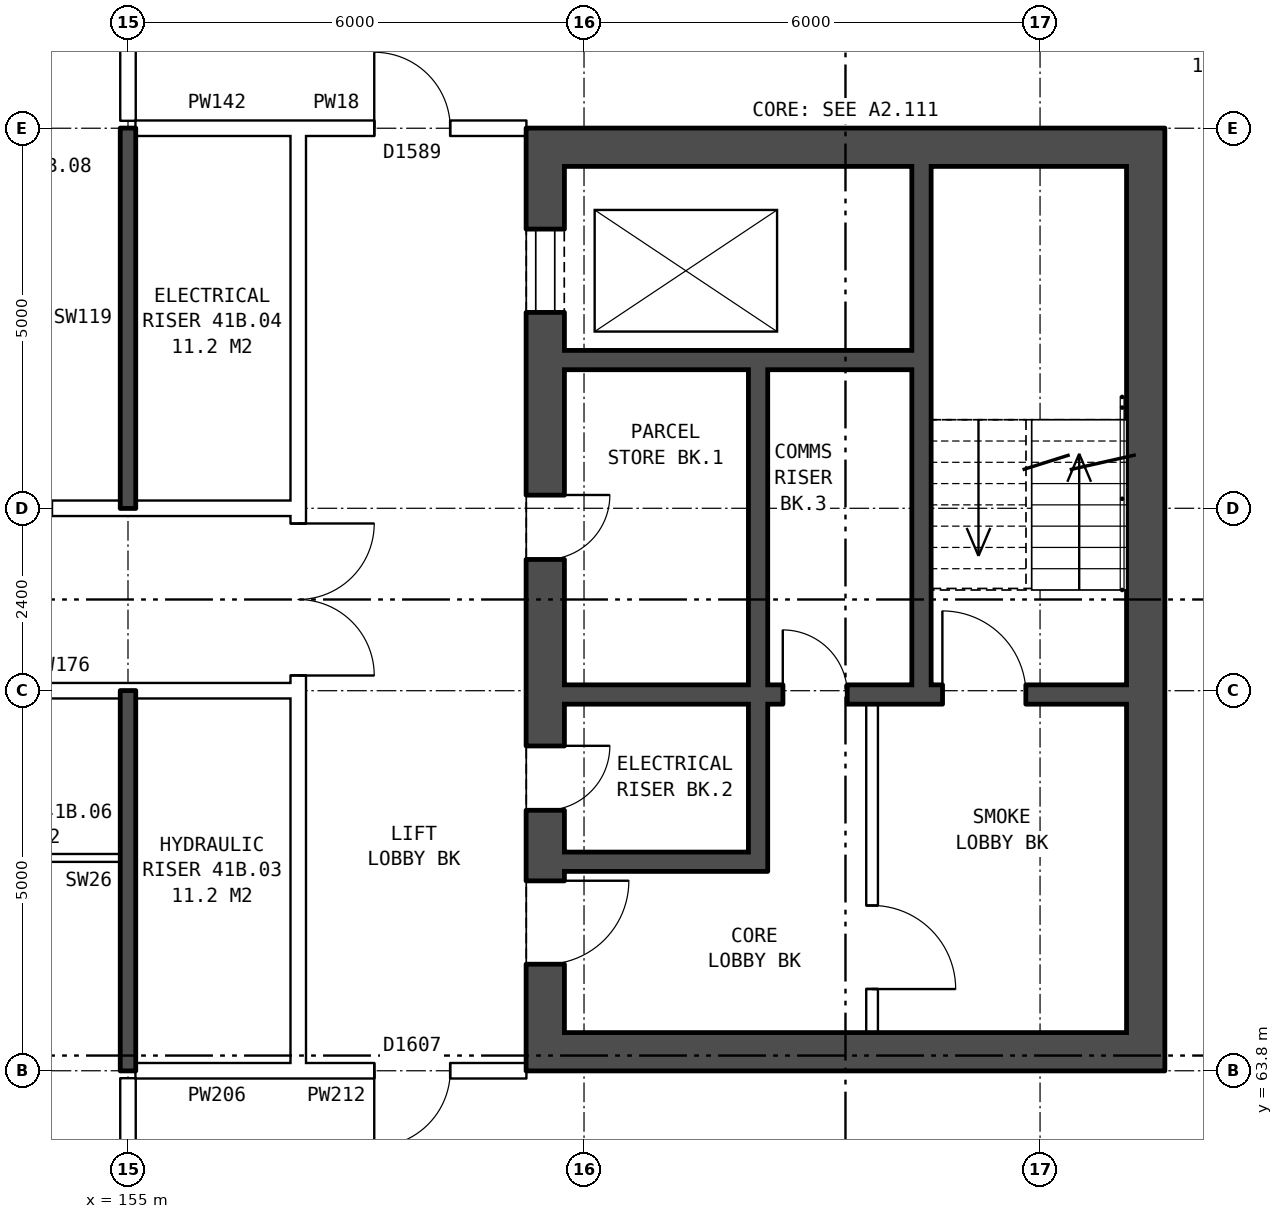
"""IFC4 building model, lengths in metres.
Left out: names, types, materials, properties, quantities, classifications, styles, units other than length and angle.
Written with IfcOpenShell. Run it as: python <this file> out.ifc"""

import sys

from ifc_helpers import new_model, si_unit, direction, frame, frame_2d, origin, place, context, subcontext, project, spatial, rectangle, extrude, element, fill, save


model = new_model("IFC4")
c1 = context("Model", 3, precision=1e-05, world=origin(), true_north=direction((0.0, 1.0)))
c2 = subcontext(c1, "Body", "Model", "MODEL_VIEW")
j1 = project(units=[si_unit("LENGTHUNIT", "METRE"), si_unit("PLANEANGLEUNIT", "RADIAN")], contexts=[c1])
p1 = place(None, origin())
s1 = spatial("IfcSite", under=j1, at=p1, CompositionType="ELEMENT")
p2 = place(p1, origin())
s2 = spatial("IfcBuilding", under=s1, at=p2, CompositionType="ELEMENT")
p3 = place(p2, frame((0.0, 0.0, 148.5)))
s3 = spatial("IfcBuildingStorey", under=s2, at=p3, CompositionType="ELEMENT", Elevation=148.5)
p4 = place(p3, frame((160.49, 76.2, 0.0), z_axis=(0.0, 0.0, 1.0), x_axis=(0.0, -1.0, 0.0)))
e1 = element("IfcWall", 1, at=p4, inside=s3, PredefinedType="SHEAR", context=c2, shape_type="SweptSolid", body=[
    extrude(rectangle(XDim=12.4, YDim=0.5, at=frame_2d((6.2, 0.0))), origin(), (0.0, 0.0, 1.0), 2.85),
])
p5 = place(p4, frame((1.325, 0.0, 0.0)))
e2 = element("IfcOpeningElement", 2, at=p5, cuts=e1, PredefinedType="OPENING", context=c2, shape_type="SweptSolid", body=[
    extrude(rectangle(XDim=1.1, YDim=2.1, at=frame_2d((0.55, 1.05))), frame((0.0, 0.26, 0.0), z_axis=(0.0, -1.0, 0.0), x_axis=(1.0, 0.0, 0.0)), (0.0, 0.0, 1.0), 0.52),
])
p6 = place(p4, frame((4.825, 0.0, 0.0)))
e3 = element("IfcOpeningElement", 3, at=p6, cuts=e1, PredefinedType="OPENING", context=c2, shape_type="SweptSolid", body=[
    extrude(rectangle(XDim=0.85, YDim=2.1, at=frame_2d((0.425, 1.05))), frame((0.0, 0.26, 0.0), z_axis=(0.0, -1.0, 0.0), x_axis=(1.0, 0.0, 0.0)), (0.0, 0.0, 1.0), 0.52),
])
p7 = place(p4, frame((9.9, 0.0, 0.0)))
e4 = element("IfcOpeningElement", 4, at=p7, cuts=e1, PredefinedType="OPENING", context=c2, shape_type="SweptSolid", body=[
    extrude(rectangle(XDim=1.1, YDim=2.1, at=frame_2d((0.55, 1.05))), frame((0.0, 0.26, 0.0), z_axis=(0.0, -1.0, 0.0), x_axis=(1.0, 0.0, 0.0)), (0.0, 0.0, 1.0), 0.52),
])
p8 = place(p4, frame((8.125, 0.0, 0.0)))
e5 = element("IfcOpeningElement", 5, at=p8, cuts=e1, PredefinedType="OPENING", context=c2, shape_type="SweptSolid", body=[
    extrude(rectangle(XDim=0.85, YDim=2.1, at=frame_2d((0.425, 1.05))), frame((0.0, 0.26, 0.0), z_axis=(0.0, -1.0, 0.0), x_axis=(1.0, 0.0, 0.0)), (0.0, 0.0, 1.0), 0.52),
])
p9 = place(p3, frame((168.39, 76.2, 0.0), z_axis=(0.0, 0.0, 1.0), x_axis=(0.0, -1.0, 0.0)))
e6 = element("IfcWall", 6, at=p9, inside=s3, PredefinedType="SHEAR", context=c2, shape_type="SweptSolid", body=[
    extrude(rectangle(XDim=12.4, YDim=0.5, at=frame_2d((6.2, 0.0))), origin(), (0.0, 0.0, 1.0), 2.85),
])
for number, where, z_axis, x_axis in (
    (7, (160.74, 75.95, 0.0), (0.0, 0.0, 1.0), (1.0, 0.0, 0.0)),
    (8, (160.74, 64.05, 0.0), (0.0, 0.0, 1.0), (1.0, 0.0, 0.0)),
):
    element("IfcWall", number, at=place(p3, frame(where, z_axis=z_axis, x_axis=x_axis)), inside=s3, PredefinedType="SHEAR", context=c2, shape_type="SweptSolid", body=[
        extrude(rectangle(XDim=7.4, YDim=0.5, at=frame_2d((3.7, 0.0))), origin(), (0.0, 0.0, 1.0), 2.85),
    ])
p10 = place(p3, frame((160.74, 73.15, 0.0), z_axis=(0.0, 0.0, 1.0), x_axis=(1.0, 0.0, 0.0)))
e9 = element("IfcWall", 9, at=p10, inside=s3, PredefinedType="SHEAR", context=c2, shape_type="SweptSolid", body=[
    extrude(rectangle(XDim=4.575, YDim=0.25, at=frame_2d((2.288, 0.0))), origin(), (0.0, 0.0, 1.0), 2.85),
])
p11 = place(p3, frame((160.74, 68.75, 0.0), z_axis=(0.0, 0.0, 1.0), x_axis=(1.0, 0.0, 0.0)))
e10 = element("IfcWall", 10, at=p11, inside=s3, PredefinedType="SHEAR", context=c2, shape_type="SweptSolid", body=[
    extrude(rectangle(XDim=7.4, YDim=0.25, at=frame_2d((3.7, 0.0))), origin(), (0.0, 0.0, 1.0), 2.85),
])
p12 = place(p11, frame((4.975, 0.0, 0.0)))
e11 = element("IfcOpeningElement", 11, at=p12, cuts=e10, PredefinedType="OPENING", context=c2, shape_type="SweptSolid", body=[
    extrude(rectangle(XDim=1.1, YDim=2.1, at=frame_2d((0.55, 1.05))), frame((0.0, 0.135, 0.0), z_axis=(0.0, -1.0, 0.0), x_axis=(1.0, 0.0, 0.0)), (0.0, 0.0, 1.0), 0.27),
])
p13 = place(p11, frame((2.875, 0.0, 0.0)))
e12 = element("IfcOpeningElement", 12, at=p13, cuts=e10, PredefinedType="OPENING", context=c2, shape_type="SweptSolid", body=[
    extrude(rectangle(XDim=0.85, YDim=2.1, at=frame_2d((0.425, 1.05))), frame((0.0, 0.135, 0.0), z_axis=(0.0, -1.0, 0.0), x_axis=(1.0, 0.0, 0.0)), (0.0, 0.0, 1.0), 0.27),
])
p14 = place(p3, frame((160.74, 66.55, 0.0), z_axis=(0.0, 0.0, 1.0), x_axis=(1.0, 0.0, 0.0)))
e13 = element("IfcWall", 13, at=p14, inside=s3, PredefinedType="SHEAR", context=c2, shape_type="SweptSolid", body=[
    extrude(rectangle(XDim=2.425, YDim=0.25, at=frame_2d((1.212, 0.0))), origin(), (0.0, 0.0, 1.0), 2.85),
])
p15 = place(p3, frame((163.29, 73.025, 0.0), z_axis=(0.0, 0.0, 1.0), x_axis=(0.0, -1.0, 0.0)))
e14 = element("IfcWall", 14, at=p15, inside=s3, PredefinedType="SHEAR", context=c2, shape_type="SweptSolid", body=[
    extrude(rectangle(XDim=4.15, YDim=0.25, at=frame_2d((2.075, 0.0))), origin(), (0.0, 0.0, 1.0), 2.85),
])
p16 = place(p3, frame((163.29, 68.625, 0.0), z_axis=(0.0, 0.0, 1.0), x_axis=(0.0, -1.0, 0.0)))
e15 = element("IfcWall", 15, at=p16, inside=s3, PredefinedType="SHEAR", context=c2, shape_type="SweptSolid", body=[
    extrude(rectangle(XDim=2.2, YDim=0.25, at=frame_2d((1.1, 0.0))), origin(), (0.0, 0.0, 1.0), 2.85),
])
p17 = place(p3, frame((164.79, 68.625, 0.0), z_axis=(0.0, 0.0, 1.0), x_axis=(0.0, -1.0, 0.0)))
e16 = element("IfcWall", 16, at=p17, inside=s3, PredefinedType="PARTITIONING", context=c2, shape_type="SweptSolid", body=[
    extrude(rectangle(XDim=4.325, YDim=0.15, at=frame_2d((2.163, 0.0))), origin(), (0.0, 0.0, 1.0), 2.85),
])
p18 = place(p17, frame((2.65, 0.0, 0.0)))
e17 = element("IfcOpeningElement", 17, at=p18, cuts=e16, PredefinedType="OPENING", context=c2, shape_type="SweptSolid", body=[
    extrude(rectangle(XDim=1.1, YDim=2.1, at=frame_2d((0.55, 1.05))), frame((0.0, 0.085, 0.0), z_axis=(0.0, -1.0, 0.0), x_axis=(1.0, 0.0, 0.0)), (0.0, 0.0, 1.0), 0.17),
])
p19 = place(p3, frame((165.44, 75.7, 0.0), z_axis=(0.0, 0.0, 1.0), x_axis=(0.0, -1.0, 0.0)))
e18 = element("IfcWall", 18, at=p19, inside=s3, PredefinedType="SHEAR", context=c2, shape_type="SweptSolid", body=[
    extrude(rectangle(XDim=6.825, YDim=0.25, at=frame_2d((3.413, 0.0))), origin(), (0.0, 0.0, 1.0), 2.85),
])
p20 = place(p3, frame((157.24, 63.9, 0.0), z_axis=(0.0, 0.0, 1.0), x_axis=(0.0, 1.0, 0.0)))
e19 = element("IfcWall", 19, at=p20, inside=s3, PredefinedType="PARTITIONING", context=c2, shape_type="SweptSolid", body=[
    extrude(rectangle(XDim=12.2, YDim=0.2, at=frame_2d((6.1, 0.0))), origin(), (0.0, 0.0, 1.0), 2.85),
])
p21 = place(p20, frame((5.1, 0.0, 0.0)))
e20 = element("IfcOpeningElement", 20, at=p21, cuts=e19, PredefinedType="OPENING", context=c2, shape_type="SweptSolid", body=[
    extrude(rectangle(XDim=2.0, YDim=2.1, at=frame_2d((1.0, 1.05))), frame((0.0, 0.11, 0.0), z_axis=(0.0, -1.0, 0.0), x_axis=(1.0, 0.0, 0.0)), (0.0, 0.0, 1.0), 0.22),
])
p22 = place(p3, frame((155.1, 63.8, 0.0), z_axis=(0.0, 0.0, 1.0), x_axis=(1.0, 0.0, 0.0)))
e21 = element("IfcWall", 21, at=p22, inside=s3, PredefinedType="PARTITIONING", context=c2, shape_type="SweptSolid", body=[
    extrude(rectangle(XDim=2.14, YDim=0.2, at=frame_2d((1.07, 0.0))), origin(), (0.0, 0.0, 1.0), 2.85),
])
p23 = place(p3, frame((157.24, 63.8, 0.0), z_axis=(0.0, 0.0, 1.0), x_axis=(1.0, 0.0, 0.0)))
e22 = element("IfcWall", 22, at=p23, inside=s3, PredefinedType="PARTITIONING", context=c2, shape_type="SweptSolid", body=[
    extrude(rectangle(XDim=3.0, YDim=0.2, at=frame_2d((1.5, 0.0))), origin(), (0.0, 0.0, 1.0), 2.85),
])
p24 = place(p23, frame((1.0, 0.0, 0.0)))
e23 = element("IfcOpeningElement", 23, at=p24, cuts=e22, PredefinedType="OPENING", context=c2, shape_type="SweptSolid", body=[
    extrude(rectangle(XDim=1.0, YDim=2.1, at=frame_2d((0.5, 1.05))), frame((0.0, 0.11, 0.0), z_axis=(0.0, -1.0, 0.0), x_axis=(1.0, 0.0, 0.0)), (0.0, 0.0, 1.0), 0.22),
])
p25 = place(p3, frame((152.0, 66.6, 0.0), z_axis=(0.0, 0.0, 1.0), x_axis=(1.0, 0.0, 0.0)))
e24 = element("IfcWall", 24, at=p25, inside=s3, PredefinedType="PARTITIONING", context=c2, shape_type="SweptSolid", body=[
    extrude(rectangle(XDim=2.9, YDim=0.1, at=frame_2d((1.45, 0.0))), origin(), (0.0, 0.0, 1.0), 2.85),
])
p26 = place(p3, frame((142.76, 68.8, 0.0), z_axis=(0.0, 0.0, 1.0), x_axis=(1.0, 0.0, 0.0)))
e25 = element("IfcWall", 25, at=p26, inside=s3, PredefinedType="PARTITIONING", context=c2, shape_type="SweptSolid", body=[
    extrude(rectangle(XDim=14.48, YDim=0.2, at=frame_2d((7.24, 0.0))), origin(), (0.0, 0.0, 1.0), 2.85),
])
p27 = place(p26, frame((1.12, 0.0, 0.0)))
e26 = element("IfcOpeningElement", 26, at=p27, cuts=e25, PredefinedType="OPENING", context=c2, shape_type="SweptSolid", body=[
    extrude(rectangle(XDim=1.0, YDim=2.1, at=frame_2d((0.5, 1.05))), frame((0.0, 0.11, 0.0), z_axis=(0.0, -1.0, 0.0), x_axis=(1.0, 0.0, 0.0)), (0.0, 0.0, 1.0), 0.22),
])
p28 = place(p26, frame((7.24, 0.0, 0.0)))
e27 = element("IfcOpeningElement", 27, at=p28, cuts=e25, PredefinedType="OPENING", context=c2, shape_type="SweptSolid", body=[
    extrude(rectangle(XDim=1.0, YDim=2.1, at=frame_2d((0.5, 1.05))), frame((0.0, 0.11, 0.0), z_axis=(0.0, -1.0, 0.0), x_axis=(1.0, 0.0, 0.0)), (0.0, 0.0, 1.0), 0.22),
])
p29 = place(p3, frame((142.76, 71.2, 0.0), z_axis=(0.0, 0.0, 1.0), x_axis=(1.0, 0.0, 0.0)))
e28 = element("IfcWall", 28, at=p29, inside=s3, PredefinedType="PARTITIONING", context=c2, shape_type="SweptSolid", body=[
    extrude(rectangle(XDim=14.48, YDim=0.2, at=frame_2d((7.24, 0.0))), origin(), (0.0, 0.0, 1.0), 2.85),
])
p30 = place(p29, frame((4.24, 0.0, 0.0)))
e29 = element("IfcOpeningElement", 29, at=p30, cuts=e28, PredefinedType="OPENING", context=c2, shape_type="SweptSolid", body=[
    extrude(rectangle(XDim=1.0, YDim=2.1, at=frame_2d((0.5, 1.05))), frame((0.0, 0.11, 0.0), z_axis=(0.0, -1.0, 0.0), x_axis=(1.0, 0.0, 0.0)), (0.0, 0.0, 1.0), 0.22),
])
p31 = place(p29, frame((10.24, 0.0, 0.0)))
e30 = element("IfcOpeningElement", 30, at=p31, cuts=e28, PredefinedType="OPENING", context=c2, shape_type="SweptSolid", body=[
    extrude(rectangle(XDim=1.0, YDim=2.1, at=frame_2d((0.5, 1.05))), frame((0.0, 0.11, 0.0), z_axis=(0.0, -1.0, 0.0), x_axis=(1.0, 0.0, 0.0)), (0.0, 0.0, 1.0), 0.22),
])
p32 = place(p3, frame((155.1, 76.2, 0.0), z_axis=(0.0, 0.0, 1.0), x_axis=(1.0, 0.0, 0.0)))
e31 = element("IfcWall", 31, at=p32, inside=s3, PredefinedType="PARTITIONING", context=c2, shape_type="SweptSolid", body=[
    extrude(rectangle(XDim=2.14, YDim=0.2, at=frame_2d((1.07, 0.0))), origin(), (0.0, 0.0, 1.0), 2.85),
])
p33 = place(p3, frame((157.24, 76.2, 0.0), z_axis=(0.0, 0.0, 1.0), x_axis=(1.0, 0.0, 0.0)))
e32 = element("IfcWall", 32, at=p33, inside=s3, PredefinedType="PARTITIONING", context=c2, shape_type="SweptSolid", body=[
    extrude(rectangle(XDim=3.0, YDim=0.2, at=frame_2d((1.5, 0.0))), origin(), (0.0, 0.0, 1.0), 2.85),
])
p34 = place(p33, frame((1.0, 0.0, 0.0)))
e33 = element("IfcOpeningElement", 33, at=p34, cuts=e32, PredefinedType="OPENING", context=c2, shape_type="SweptSolid", body=[
    extrude(rectangle(XDim=1.0, YDim=2.1, at=frame_2d((0.5, 1.05))), frame((0.0, 0.11, 0.0), z_axis=(0.0, -1.0, 0.0), x_axis=(1.0, 0.0, 0.0)), (0.0, 0.0, 1.0), 0.22),
])
p35 = place(p3, frame((155.0, 61.5, 0.0), z_axis=(0.0, 0.0, 1.0), x_axis=(0.0, 1.0, 0.0)))
e34 = element("IfcWall", 34, at=p35, inside=s3, PredefinedType="PARTITIONING", context=c2, shape_type="SweptSolid", body=[
    extrude(rectangle(XDim=2.2, YDim=0.2, at=frame_2d((1.1, 0.0))), origin(), (0.0, 0.0, 1.0), 2.85),
])
for number, where, z_axis, x_axis in (
    (35, (155.0, 63.8, 0.0), (0.0, 0.0, 1.0), (0.0, 1.0, 0.0)),
    (36, (155.0, 71.2, 0.0), (0.0, 0.0, 1.0), (0.0, 1.0, 0.0)),
):
    element("IfcWall", number, at=place(p3, frame(where, z_axis=z_axis, x_axis=x_axis)), inside=s3, PredefinedType="SOLIDWALL", context=c2, shape_type="SweptSolid", body=[
        extrude(rectangle(XDim=5.0, YDim=0.2, at=frame_2d((2.5, 0.0))), origin(), (0.0, 0.0, 1.0), 2.85),
    ])
p36 = place(p3, frame((155.0, 76.3, 0.0), z_axis=(0.0, 0.0, 1.0), x_axis=(0.0, 1.0, 0.0)))
e37 = element("IfcWall", 37, at=p36, inside=s3, PredefinedType="PARTITIONING", context=c2, shape_type="SweptSolid", body=[
    extrude(rectangle(XDim=2.2, YDim=0.2, at=frame_2d((1.1, 0.0))), origin(), (0.0, 0.0, 1.0), 2.85),
])
p37 = place(p5, origin())
e38 = element("IfcDoor", 38, at=p37, inside=s3, OperationType="DOUBLE_DOOR_SLIDING", PredefinedType="DOOR", context=c2, shape_type="SweptSolid", body=[
    extrude(rectangle(XDim=1.1, YDim=2.1, at=frame_2d((0.55, 1.05))), frame((0.0, 0.235, 0.0), z_axis=(0.0, -1.0, 0.0), x_axis=(1.0, 0.0, 0.0)), (0.0, 0.0, 1.0), 0.05),
])
fill(e2, e38)
p38 = place(p6, origin())
e39 = element("IfcDoor", 39, at=p38, inside=s3, OperationType="SINGLE_SWING_LEFT", PredefinedType="DOOR", context=c2, shape_type="SweptSolid", body=[
    extrude(rectangle(XDim=0.85, YDim=2.1, at=frame_2d((0.425, 1.05))), frame((0.0, 0.235, 0.0), z_axis=(0.0, -1.0, 0.0), x_axis=(1.0, 0.0, 0.0)), (0.0, 0.0, 1.0), 0.05),
])
fill(e3, e39)
p39 = place(p7, origin())
e40 = element("IfcDoor", 40, at=p39, inside=s3, OperationType="SINGLE_SWING_LEFT", PredefinedType="DOOR", context=c2, shape_type="SweptSolid", body=[
    extrude(rectangle(XDim=1.1, YDim=2.1, at=frame_2d((0.55, 1.05))), frame((0.0, 0.235, 0.0), z_axis=(0.0, -1.0, 0.0), x_axis=(1.0, 0.0, 0.0)), (0.0, 0.0, 1.0), 0.05),
])
fill(e4, e40)
p40 = place(p18, origin())
e41 = element("IfcDoor", 41, at=p40, inside=s3, OperationType="SINGLE_SWING_RIGHT", PredefinedType="DOOR", context=c2, shape_type="SweptSolid", body=[
    extrude(rectangle(XDim=1.1, YDim=2.1, at=frame_2d((0.55, 1.05))), frame((0.0, 0.025, 0.0), z_axis=(0.0, -1.0, 0.0), x_axis=(1.0, 0.0, 0.0)), (0.0, 0.0, 1.0), 0.05),
])
fill(e17, e41)
p41 = place(p12, origin())
e42 = element("IfcDoor", 42, at=p41, inside=s3, OperationType="SINGLE_SWING_LEFT", PredefinedType="DOOR", context=c2, shape_type="SweptSolid", body=[
    extrude(rectangle(XDim=1.1, YDim=2.1, at=frame_2d((0.55, 1.05))), frame((0.0, 0.025, 0.0), z_axis=(0.0, -1.0, 0.0), x_axis=(1.0, 0.0, 0.0)), (0.0, 0.0, 1.0), 0.05),
])
fill(e11, e42)
p42 = place(p8, origin())
e43 = element("IfcDoor", 43, at=p42, inside=s3, OperationType="SINGLE_SWING_LEFT", PredefinedType="DOOR", context=c2, shape_type="SweptSolid", body=[
    extrude(rectangle(XDim=0.85, YDim=2.1, at=frame_2d((0.425, 1.05))), frame((0.0, 0.235, 0.0), z_axis=(0.0, -1.0, 0.0), x_axis=(1.0, 0.0, 0.0)), (0.0, 0.0, 1.0), 0.05),
])
fill(e5, e43)
p43 = place(p13, origin())
e44 = element("IfcDoor", 44, at=p43, inside=s3, OperationType="SINGLE_SWING_LEFT", PredefinedType="DOOR", context=c2, shape_type="SweptSolid", body=[
    extrude(rectangle(XDim=0.85, YDim=2.1, at=frame_2d((0.425, 1.05))), frame((0.0, 0.025, 0.0), z_axis=(0.0, -1.0, 0.0), x_axis=(1.0, 0.0, 0.0)), (0.0, 0.0, 1.0), 0.05),
])
fill(e12, e44)
p44 = place(p21, frame((2.0, 0.0, 0.0), z_axis=(0.0, 0.0, 1.0), x_axis=(-1.0, 0.0, 0.0)))
e45 = element("IfcDoor", 45, at=p44, inside=s3, OperationType="DOUBLE_DOOR_SINGLE_SWING", PredefinedType="DOOR", context=c2, shape_type="SweptSolid", body=[
    extrude(rectangle(XDim=2.0, YDim=2.1, at=frame_2d((1.0, 1.05))), frame((0.0, 0.025, 0.0), z_axis=(0.0, -1.0, 0.0), x_axis=(1.0, 0.0, 0.0)), (0.0, 0.0, 1.0), 0.05),
])
fill(e20, e45)
p45 = place(p24, frame((1.0, 0.0, 0.0), z_axis=(0.0, 0.0, 1.0), x_axis=(-1.0, 0.0, 0.0)))
e46 = element("IfcDoor", 46, at=p45, inside=s3, OperationType="SINGLE_SWING_RIGHT", PredefinedType="DOOR", context=c2, shape_type="SweptSolid", body=[
    extrude(rectangle(XDim=1.0, YDim=2.1, at=frame_2d((0.5, 1.05))), frame((0.0, 0.025, 0.0), z_axis=(0.0, -1.0, 0.0), x_axis=(1.0, 0.0, 0.0)), (0.0, 0.0, 1.0), 0.05),
])
fill(e23, e46)
p46 = place(p34, origin())
e47 = element("IfcDoor", 47, at=p46, inside=s3, OperationType="SINGLE_SWING_LEFT", PredefinedType="DOOR", context=c2, shape_type="SweptSolid", body=[
    extrude(rectangle(XDim=1.0, YDim=2.1, at=frame_2d((0.5, 1.05))), frame((0.0, 0.025, 0.0), z_axis=(0.0, -1.0, 0.0), x_axis=(1.0, 0.0, 0.0)), (0.0, 0.0, 1.0), 0.05),
])
fill(e33, e47)
save(model, sys.argv[1])
